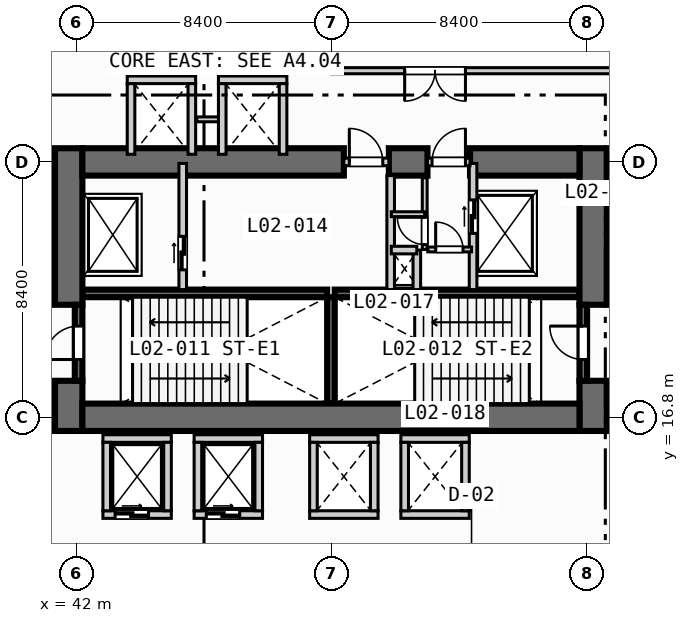
"""IFC4 building model, lengths in metres.
Left out: names, types, materials, properties, quantities, classifications, styles, units other than length and angle.
Written with IfcOpenShell. Run it as: python <this file> out.ifc"""

import sys

from ifc_helpers import new_model, si_unit, direction, frame, frame_2d, origin, place, context, subcontext, project, spatial, rectangle, extrude, element, fill, save


model = new_model("IFC4")
c1 = context("Model", 3, precision=1e-05, world=origin(), true_north=direction((0.0, 1.0)))
c2 = subcontext(c1, "Body", "Model", "MODEL_VIEW")
j1 = project(units=[si_unit("LENGTHUNIT", "METRE"), si_unit("PLANEANGLEUNIT", "RADIAN")], contexts=[c1])
p1 = place(None, origin())
s1 = spatial("IfcSite", under=j1, at=p1, CompositionType="ELEMENT")
p2 = place(p1, origin())
s2 = spatial("IfcBuilding", under=s1, at=p2, CompositionType="ELEMENT")
p3 = place(p2, frame((0.0, 0.0, 10.8)))
s3 = spatial("IfcBuildingStorey", under=s2, at=p3, CompositionType="ELEMENT", Elevation=10.8)
for number, where, z_axis, x_axis in (
    (1, (42.2, 20.875, 0.0), (0.0, 0.0, 1.0), (1.0, 0.0, 0.0)),
    (2, (50.5, 20.875, 0.0), (0.0, 0.0, 1.0), (1.0, 0.0, 0.0)),
):
    element("IfcWall", number, at=place(p3, frame(where, z_axis=z_axis, x_axis=x_axis)), inside=s3, PredefinedType="SOLIDWALL", context=c2, shape_type="SweptSolid", body=[
        extrude(rectangle(XDim=8.05, YDim=0.25, at=frame_2d((4.025, 0.0))), origin(), (0.0, 0.0, 1.0), 4.45),
    ])
p4 = place(p3, frame((50.375, 17.25, 0.0), z_axis=(0.0, 0.0, 1.0), x_axis=(0.0, 1.0, 0.0)))
e3 = element("IfcWall", 3, at=p4, inside=s3, PredefinedType="SOLIDWALL", context=c2, shape_type="SweptSolid", body=[
    extrude(rectangle(XDim=3.5, YDim=0.25, at=frame_2d((1.75, 0.0))), origin(), (0.0, 0.0, 1.0), 4.45),
])
p5 = place(p3, frame((41.75, 16.35, 0.0), z_axis=(0.0, 0.0, 1.0), x_axis=(0.0, 1.0, 0.0)))
e4 = element("IfcWall", 4, at=p5, inside=s3, PredefinedType="SHEAR", context=c2, shape_type="SweptSolid", body=[
    extrude(rectangle(XDim=1.65, YDim=0.9, at=frame_2d((0.825, 0.0))), origin(), (0.0, 0.0, 1.0), 4.45),
])
p6 = place(p3, frame((41.75, 20.5, 0.0), z_axis=(0.0, 0.0, 1.0), x_axis=(0.0, 1.0, 0.0)))
e5 = element("IfcWall", 5, at=p6, inside=s3, PredefinedType="SHEAR", context=c2, shape_type="SweptSolid", body=[
    extrude(rectangle(XDim=5.15, YDim=0.9, at=frame_2d((2.575, 0.0))), origin(), (0.0, 0.0, 1.0), 4.45),
])
p7 = place(p3, frame((59.0, 16.35, 0.0), z_axis=(0.0, 0.0, 1.0), x_axis=(0.0, 1.0, 0.0)))
e6 = element("IfcWall", 6, at=p7, inside=s3, PredefinedType="SHEAR", context=c2, shape_type="SweptSolid", body=[
    extrude(rectangle(XDim=1.65, YDim=0.9, at=frame_2d((0.825, 0.0))), origin(), (0.0, 0.0, 1.0), 4.45),
])
p8 = place(p3, frame((59.0, 20.5, 0.0), z_axis=(0.0, 0.0, 1.0), x_axis=(0.0, 1.0, 0.0)))
e7 = element("IfcWall", 7, at=p8, inside=s3, PredefinedType="SHEAR", context=c2, shape_type="SweptSolid", body=[
    extrude(rectangle(XDim=5.15, YDim=0.9, at=frame_2d((2.575, 0.0))), origin(), (0.0, 0.0, 1.0), 4.45),
])
p9 = place(p3, frame((42.2, 16.8, 0.0), z_axis=(0.0, 0.0, 1.0), x_axis=(1.0, 0.0, 0.0)))
e8 = element("IfcWall", 8, at=p9, inside=s3, PredefinedType="SHEAR", context=c2, shape_type="SweptSolid", body=[
    extrude(rectangle(XDim=16.35, YDim=0.9, at=frame_2d((8.175, 0.0))), origin(), (0.0, 0.0, 1.0), 4.45),
])
p10 = place(p3, frame((42.2, 25.2, 0.0), z_axis=(0.0, 0.0, 1.0), x_axis=(1.0, 0.0, 0.0)))
e9 = element("IfcWall", 9, at=p10, inside=s3, PredefinedType="SHEAR", context=c2, shape_type="SweptSolid", body=[
    extrude(rectangle(XDim=8.6, YDim=0.9, at=frame_2d((4.3, 0.0))), origin(), (0.0, 0.0, 1.0), 4.45),
])
p11 = place(p3, frame((52.28, 25.2, 0.0), z_axis=(0.0, 0.0, 1.0), x_axis=(1.0, 0.0, 0.0)))
e10 = element("IfcWall", 10, at=p11, inside=s3, PredefinedType="SHEAR", context=c2, shape_type="SweptSolid", body=[
    extrude(rectangle(XDim=1.27, YDim=0.9, at=frame_2d((0.635, 0.0))), origin(), (0.0, 0.0, 1.0), 4.45),
])
p12 = place(p3, frame((54.95, 25.2, 0.0), z_axis=(0.0, 0.0, 1.0), x_axis=(1.0, 0.0, 0.0)))
e11 = element("IfcWall", 11, at=p12, inside=s3, PredefinedType="SHEAR", context=c2, shape_type="SweptSolid", body=[
    extrude(rectangle(XDim=3.6, YDim=0.9, at=frame_2d((1.8, 0.0))), origin(), (0.0, 0.0, 1.0), 4.45),
])
p13 = place(p3, frame((42.075, 18.0, 0.0), z_axis=(0.0, 0.0, 1.0), x_axis=(0.0, 1.0, 0.0)))
e12 = element("IfcWall", 12, at=p13, inside=s3, PredefinedType="SOLIDWALL", context=c2, shape_type="SweptSolid", body=[
    extrude(rectangle(XDim=2.5, YDim=0.25, at=frame_2d((1.25, 0.0))), origin(), (0.0, 0.0, 1.0), 4.45),
])
p14 = place(p13, frame((0.7, 0.0, 0.0)))
e13 = element("IfcOpeningElement", 13, at=p14, cuts=e12, PredefinedType="OPENING", context=c2, shape_type="SweptSolid", body=[
    extrude(rectangle(XDim=1.1, YDim=2.15, at=frame_2d((0.55, 1.075))), frame((0.0, 0.135, 0.0), z_axis=(0.0, -1.0, 0.0), x_axis=(1.0, 0.0, 0.0)), (0.0, 0.0, 1.0), 0.27),
])
p15 = place(p3, frame((58.675, 18.0, 0.0), z_axis=(0.0, 0.0, 1.0), x_axis=(0.0, 1.0, 0.0)))
e14 = element("IfcWall", 14, at=p15, inside=s3, PredefinedType="SOLIDWALL", context=c2, shape_type="SweptSolid", body=[
    extrude(rectangle(XDim=2.5, YDim=0.25, at=frame_2d((1.25, 0.0))), origin(), (0.0, 0.0, 1.0), 4.45),
])
p16 = place(p15, frame((0.7, 0.0, 0.0)))
e15 = element("IfcOpeningElement", 15, at=p16, cuts=e14, PredefinedType="OPENING", context=c2, shape_type="SweptSolid", body=[
    extrude(rectangle(XDim=1.1, YDim=2.15, at=frame_2d((0.55, 1.075))), frame((0.0, 0.135, 0.0), z_axis=(0.0, -1.0, 0.0), x_axis=(1.0, 0.0, 0.0)), (0.0, 0.0, 1.0), 0.27),
])
p17 = place(p3, frame((45.5, 21.0, 0.0), z_axis=(0.0, 0.0, 1.0), x_axis=(0.0, 1.0, 0.0)))
e16 = element("IfcWall", 16, at=p17, inside=s3, PredefinedType="SOLIDWALL", context=c2, shape_type="SweptSolid", body=[
    extrude(rectangle(XDim=4.15, YDim=0.25, at=frame_2d((2.075, 0.0))), origin(), (0.0, 0.0, 1.0), 4.45),
])
p18 = place(p17, frame((0.65, 0.0, 0.0)))
e17 = element("IfcOpeningElement", 17, at=p18, cuts=e16, PredefinedType="OPENING", context=c2, shape_type="SweptSolid", body=[
    extrude(rectangle(XDim=1.1, YDim=2.15, at=frame_2d((0.55, 1.075))), frame((0.0, 0.135, 0.0), z_axis=(0.0, -1.0, 0.0), x_axis=(1.0, 0.0, 0.0)), (0.0, 0.0, 1.0), 0.27),
])
p19 = place(p3, frame((50.8, 25.2, 0.0), z_axis=(0.0, 0.0, 1.0), x_axis=(1.0, 0.0, 0.0)))
e18 = element("IfcWall", 18, at=p19, inside=s3, PredefinedType="SOLIDWALL", context=c2, shape_type="SweptSolid", body=[
    extrude(rectangle(XDim=1.48, YDim=0.25, at=frame_2d((0.74, 0.0))), origin(), (0.0, 0.0, 1.0), 4.45),
])
p20 = place(p19, frame((0.18, 0.0, 0.0)))
e19 = element("IfcOpeningElement", 19, at=p20, cuts=e18, PredefinedType="OPENING", context=c2, shape_type="SweptSolid", body=[
    extrude(rectangle(XDim=1.1, YDim=2.15, at=frame_2d((0.55, 1.075))), frame((0.0, 0.135, 0.0), z_axis=(0.0, -1.0, 0.0), x_axis=(1.0, 0.0, 0.0)), (0.0, 0.0, 1.0), 0.27),
])
p21 = place(p3, frame((52.34, 21.0, 0.0), z_axis=(0.0, 0.0, 1.0), x_axis=(0.0, 1.0, 0.0)))
e20 = element("IfcWall", 20, at=p21, inside=s3, PredefinedType="SOLIDWALL", context=c2, shape_type="SweptSolid", body=[
    extrude(rectangle(XDim=3.75, YDim=0.25, at=frame_2d((1.875, 0.0))), origin(), (0.0, 0.0, 1.0), 4.45),
])
p22 = place(p3, frame((55.05, 21.0, 0.0), z_axis=(0.0, 0.0, 1.0), x_axis=(0.0, 1.0, 0.0)))
e21 = element("IfcWall", 21, at=p22, inside=s3, PredefinedType="SOLIDWALL", context=c2, shape_type="SweptSolid", body=[
    extrude(rectangle(XDim=4.15, YDim=0.25, at=frame_2d((2.075, 0.0))), origin(), (0.0, 0.0, 1.0), 4.45),
])
p23 = place(p22, frame((1.85, 0.0, 0.0)))
e22 = element("IfcOpeningElement", 22, at=p23, cuts=e21, PredefinedType="OPENING", context=c2, shape_type="SweptSolid", body=[
    extrude(rectangle(XDim=1.1, YDim=2.15, at=frame_2d((0.55, 1.075))), frame((0.0, 0.135, 0.0), z_axis=(0.0, -1.0, 0.0), x_axis=(1.0, 0.0, 0.0)), (0.0, 0.0, 1.0), 0.27),
])
p24 = place(p3, frame((53.55, 25.2, 0.0), z_axis=(0.0, 0.0, 1.0), x_axis=(1.0, 0.0, 0.0)))
e23 = element("IfcWall", 23, at=p24, inside=s3, PredefinedType="SOLIDWALL", context=c2, shape_type="SweptSolid", body=[
    extrude(rectangle(XDim=1.4, YDim=0.25, at=frame_2d((0.7, 0.0))), origin(), (0.0, 0.0, 1.0), 4.45),
])
p25 = place(p24, frame((0.15, 0.0, 0.0)))
e24 = element("IfcOpeningElement", 24, at=p25, cuts=e23, PredefinedType="OPENING", context=c2, shape_type="SweptSolid", body=[
    extrude(rectangle(XDim=1.1, YDim=2.15, at=frame_2d((0.55, 1.075))), frame((0.0, 0.135, 0.0), z_axis=(0.0, -1.0, 0.0), x_axis=(1.0, 0.0, 0.0)), (0.0, 0.0, 1.0), 0.27),
])
p26 = place(p3, frame((53.2, 21.0, 0.0), z_axis=(0.0, 0.0, 1.0), x_axis=(0.0, 1.0, 0.0)))
e25 = element("IfcWall", 25, at=p26, inside=s3, PredefinedType="SOLIDWALL", context=c2, shape_type="SweptSolid", body=[
    extrude(rectangle(XDim=1.3, YDim=0.25, at=frame_2d((0.65, 0.0))), origin(), (0.0, 0.0, 1.0), 4.45),
])
p27 = place(p3, frame((52.36, 22.3, 0.0), z_axis=(0.0, 0.0, 1.0), x_axis=(1.0, 0.0, 0.0)))
e26 = element("IfcWall", 26, at=p27, inside=s3, PredefinedType="SOLIDWALL", context=c2, shape_type="SweptSolid", body=[
    extrude(rectangle(XDim=0.84, YDim=0.25, at=frame_2d((0.42, 0.0))), origin(), (0.0, 0.0, 1.0), 4.45),
])
p28 = place(p3, frame((53.56, 22.32, 0.0), z_axis=(0.0, 0.0, 1.0), x_axis=(1.0, 0.0, 0.0)))
e27 = element("IfcWall", 27, at=p28, inside=s3, PredefinedType="PARTITIONING", context=c2, shape_type="SweptSolid", body=[
    extrude(rectangle(XDim=1.44, YDim=0.16, at=frame_2d((0.72, 0.0))), origin(), (0.0, 0.0, 1.0), 4.45),
])
p29 = place(p28, frame((0.26, 0.0, 0.0)))
e28 = element("IfcOpeningElement", 28, at=p29, cuts=e27, PredefinedType="OPENING", context=c2, shape_type="SweptSolid", body=[
    extrude(rectangle(XDim=0.9, YDim=2.1, at=frame_2d((0.45, 1.05))), frame((0.0, 0.09, 0.0), z_axis=(0.0, -1.0, 0.0), x_axis=(1.0, 0.0, 0.0)), (0.0, 0.0, 1.0), 0.18),
])
p30 = place(p3, frame((53.46, 22.32, 0.0), z_axis=(0.0, 0.0, 1.0), x_axis=(0.0, 1.0, 0.0)))
e29 = element("IfcWall", 29, at=p30, inside=s3, PredefinedType="PARTITIONING", context=c2, shape_type="SweptSolid", body=[
    extrude(rectangle(XDim=2.36, YDim=0.16, at=frame_2d((1.18, 0.0))), origin(), (0.0, 0.0, 1.0), 4.45),
])
p31 = place(p30, frame((0.16, 0.0, 0.0)))
e30 = element("IfcOpeningElement", 30, at=p31, cuts=e29, PredefinedType="OPENING", context=c2, shape_type="SweptSolid", body=[
    extrude(rectangle(XDim=0.9, YDim=2.1, at=frame_2d((0.45, 1.05))), frame((0.0, 0.09, 0.0), z_axis=(0.0, -1.0, 0.0), x_axis=(1.0, 0.0, 0.0)), (0.0, 0.0, 1.0), 0.18),
])
p32 = place(p3, frame((52.36, 23.48, 0.0), z_axis=(0.0, 0.0, 1.0), x_axis=(1.0, 0.0, 0.0)))
e31 = element("IfcWall", 31, at=p32, inside=s3, PredefinedType="PARTITIONING", context=c2, shape_type="SweptSolid", body=[
    extrude(rectangle(XDim=1.1, YDim=0.16, at=frame_2d((0.55, 0.0))), origin(), (0.0, 0.0, 1.0), 4.45),
])
p33 = place(p3, frame((42.875, 13.6, 0.0), z_axis=(0.0, 0.0, 1.0), x_axis=(1.0, 0.0, 0.0)))
e32 = element("IfcWall", 32, at=p33, inside=s3, PredefinedType="SOLIDWALL", context=c2, shape_type="SweptSolid", body=[
    extrude(rectangle(XDim=2.25, YDim=0.25, at=frame_2d((1.125, 0.0))), origin(), (0.0, 0.0, 1.0), 4.45),
])
p34 = place(p33, frame((0.4, 0.0, 0.0)))
e33 = element("IfcOpeningElement", 33, at=p34, cuts=e32, PredefinedType="OPENING", context=c2, shape_type="SweptSolid", body=[
    extrude(rectangle(XDim=1.1, YDim=2.15, at=frame_2d((0.55, 1.075))), frame((0.0, 0.135, 0.0), z_axis=(0.0, -1.0, 0.0), x_axis=(1.0, 0.0, 0.0)), (0.0, 0.0, 1.0), 0.27),
])
for number, where, z_axis, x_axis in (
    (34, (42.875, 16.1, 0.0), (0.0, 0.0, 1.0), (1.0, 0.0, 0.0)),
    (35, (43.0, 13.725, 0.0), (0.0, 0.0, 1.0), (0.0, 1.0, 0.0)),
    (36, (45.0, 13.725, 0.0), (0.0, 0.0, 1.0), (0.0, 1.0, 0.0)),
):
    element("IfcWall", number, at=place(p3, frame(where, z_axis=z_axis, x_axis=x_axis)), inside=s3, PredefinedType="SOLIDWALL", context=c2, shape_type="SweptSolid", body=[
        extrude(rectangle(XDim=2.25, YDim=0.25, at=frame_2d((1.125, 0.0))), origin(), (0.0, 0.0, 1.0), 4.45),
    ])
p35 = place(p3, frame((45.875, 13.6, 0.0), z_axis=(0.0, 0.0, 1.0), x_axis=(1.0, 0.0, 0.0)))
e37 = element("IfcWall", 37, at=p35, inside=s3, PredefinedType="SOLIDWALL", context=c2, shape_type="SweptSolid", body=[
    extrude(rectangle(XDim=2.25, YDim=0.25, at=frame_2d((1.125, 0.0))), origin(), (0.0, 0.0, 1.0), 4.45),
])
p36 = place(p35, frame((0.4, 0.0, 0.0)))
e38 = element("IfcOpeningElement", 38, at=p36, cuts=e37, PredefinedType="OPENING", context=c2, shape_type="SweptSolid", body=[
    extrude(rectangle(XDim=1.1, YDim=2.15, at=frame_2d((0.55, 1.075))), frame((0.0, 0.135, 0.0), z_axis=(0.0, -1.0, 0.0), x_axis=(1.0, 0.0, 0.0)), (0.0, 0.0, 1.0), 0.27),
])
for number, where, z_axis, x_axis in (
    (39, (45.875, 16.1, 0.0), (0.0, 0.0, 1.0), (1.0, 0.0, 0.0)),
    (40, (46.0, 13.725, 0.0), (0.0, 0.0, 1.0), (0.0, 1.0, 0.0)),
    (41, (48.0, 13.725, 0.0), (0.0, 0.0, 1.0), (0.0, 1.0, 0.0)),
    (42, (49.675, 13.6, 0.0), (0.0, 0.0, 1.0), (1.0, 0.0, 0.0)),
    (43, (49.675, 16.1, 0.0), (0.0, 0.0, 1.0), (1.0, 0.0, 0.0)),
    (44, (49.8, 13.725, 0.0), (0.0, 0.0, 1.0), (0.0, 1.0, 0.0)),
    (45, (51.8, 13.725, 0.0), (0.0, 0.0, 1.0), (0.0, 1.0, 0.0)),
    (46, (52.675, 13.6, 0.0), (0.0, 0.0, 1.0), (1.0, 0.0, 0.0)),
    (47, (52.675, 16.1, 0.0), (0.0, 0.0, 1.0), (1.0, 0.0, 0.0)),
    (48, (52.8, 13.725, 0.0), (0.0, 0.0, 1.0), (0.0, 1.0, 0.0)),
    (49, (54.8, 13.725, 0.0), (0.0, 0.0, 1.0), (0.0, 1.0, 0.0)),
    (50, (43.675, 27.9, 0.0), (0.0, 0.0, 1.0), (1.0, 0.0, 0.0)),
):
    element("IfcWall", number, at=place(p3, frame(where, z_axis=z_axis, x_axis=x_axis)), inside=s3, PredefinedType="SOLIDWALL", context=c2, shape_type="SweptSolid", body=[
        extrude(rectangle(XDim=2.25, YDim=0.25, at=frame_2d((1.125, 0.0))), origin(), (0.0, 0.0, 1.0), 4.45),
    ])
for number, where, z_axis, x_axis in (
    (51, (43.8, 25.45, 0.0), (0.0, 0.0, 1.0), (0.0, 1.0, 0.0)),
    (52, (45.8, 25.45, 0.0), (0.0, 0.0, 1.0), (0.0, 1.0, 0.0)),
):
    element("IfcWall", number, at=place(p3, frame(where, z_axis=z_axis, x_axis=x_axis)), inside=s3, PredefinedType="SOLIDWALL", context=c2, shape_type="SweptSolid", body=[
        extrude(rectangle(XDim=2.325, YDim=0.25, at=frame_2d((1.163, 0.0))), origin(), (0.0, 0.0, 1.0), 4.45),
    ])
p37 = place(p3, frame((45.96, 26.6, 0.0), z_axis=(0.0, 0.0, 1.0), x_axis=(1.0, 0.0, 0.0)))
e53 = element("IfcWall", 53, at=p37, inside=s3, PredefinedType="PARTITIONING", context=c2, shape_type="SweptSolid", body=[
    extrude(rectangle(XDim=0.88, YDim=0.16, at=frame_2d((0.44, 0.0))), origin(), (0.0, 0.0, 1.0), 4.45),
])
p38 = place(p3, frame((46.675, 27.9, 0.0), z_axis=(0.0, 0.0, 1.0), x_axis=(1.0, 0.0, 0.0)))
e54 = element("IfcWall", 54, at=p38, inside=s3, PredefinedType="SOLIDWALL", context=c2, shape_type="SweptSolid", body=[
    extrude(rectangle(XDim=2.25, YDim=0.25, at=frame_2d((1.125, 0.0))), origin(), (0.0, 0.0, 1.0), 4.45),
])
for number, where, z_axis, x_axis in (
    (55, (46.8, 25.45, 0.0), (0.0, 0.0, 1.0), (0.0, 1.0, 0.0)),
    (56, (48.8, 25.45, 0.0), (0.0, 0.0, 1.0), (0.0, 1.0, 0.0)),
):
    element("IfcWall", number, at=place(p3, frame(where, z_axis=z_axis, x_axis=x_axis)), inside=s3, PredefinedType="SOLIDWALL", context=c2, shape_type="SweptSolid", body=[
        extrude(rectangle(XDim=2.325, YDim=0.25, at=frame_2d((1.163, 0.0))), origin(), (0.0, 0.0, 1.0), 4.45),
    ])
p39 = place(p3, frame((50.4, 28.2, 0.0), z_axis=(0.0, 0.0, 1.0), x_axis=(1.0, 0.0, 0.0)))
e57 = element("IfcWall", 57, at=p39, inside=s3, PredefinedType="PARTITIONING", context=c2, shape_type="SweptSolid", body=[
    extrude(rectangle(XDim=38.6, YDim=0.2, at=frame_2d((19.3, 0.0))), origin(), (0.0, 0.0, 1.0), 4.45),
])
p40 = place(p39, frame((2.4, 0.0, 0.0)))
e58 = element("IfcOpeningElement", 58, at=p40, cuts=e57, PredefinedType="OPENING", context=c2, shape_type="SweptSolid", body=[
    extrude(rectangle(XDim=2.0, YDim=2.15, at=frame_2d((1.0, 1.075))), frame((0.0, 0.11, 0.0), z_axis=(0.0, -1.0, 0.0), x_axis=(1.0, 0.0, 0.0)), (0.0, 0.0, 1.0), 0.22),
])
p41 = place(p39, frame((22.0, 0.0, 0.0)))
e59 = element("IfcOpeningElement", 59, at=p41, cuts=e57, PredefinedType="OPENING", context=c2, shape_type="SweptSolid", body=[
    extrude(rectangle(XDim=2.0, YDim=2.15, at=frame_2d((1.0, 1.075))), frame((0.0, 0.11, 0.0), z_axis=(0.0, -1.0, 0.0), x_axis=(1.0, 0.0, 0.0)), (0.0, 0.0, 1.0), 0.22),
])
p42 = place(p3, frame((50.4, 28.2, 0.0), z_axis=(0.0, 0.0, 1.0), x_axis=(0.0, 1.0, 0.0)))
e60 = element("IfcWall", 60, at=p42, inside=s3, PredefinedType="PARTITIONING", context=c2, shape_type="SweptSolid", body=[
    extrude(rectangle(XDim=13.4, YDim=0.22, at=frame_2d((6.7, 0.0))), origin(), (0.0, 0.0, 1.0), 3.6),
])
p43 = place(p14, origin())
e61 = element("IfcDoor", 61, at=p43, inside=s3, OperationType="SINGLE_SWING_LEFT", PredefinedType="DOOR", context=c2, shape_type="SweptSolid", body=[
    extrude(rectangle(XDim=1.1, YDim=2.15, at=frame_2d((0.55, 1.075))), frame((0.0, 0.025, 0.0), z_axis=(0.0, -1.0, 0.0), x_axis=(1.0, 0.0, 0.0)), (0.0, 0.0, 1.0), 0.05),
])
fill(e13, e61)
p44 = place(p16, origin())
e62 = element("IfcDoor", 62, at=p44, inside=s3, OperationType="SINGLE_SWING_RIGHT", PredefinedType="DOOR", context=c2, shape_type="SweptSolid", body=[
    extrude(rectangle(XDim=1.1, YDim=2.15, at=frame_2d((0.55, 1.075))), frame((0.0, 0.025, 0.0), z_axis=(0.0, -1.0, 0.0), x_axis=(1.0, 0.0, 0.0)), (0.0, 0.0, 1.0), 0.05),
])
fill(e15, e62)
p45 = place(p18, origin())
e63 = element("IfcDoor", 63, at=p45, inside=s3, OperationType="SLIDING_TO_LEFT", PredefinedType="DOOR", context=c2, shape_type="SweptSolid", body=[
    extrude(rectangle(XDim=1.1, YDim=2.15, at=frame_2d((0.55, 1.075))), frame((0.0, 0.025, 0.0), z_axis=(0.0, -1.0, 0.0), x_axis=(1.0, 0.0, 0.0)), (0.0, 0.0, 1.0), 0.05),
])
fill(e17, e63)
p46 = place(p20, origin())
e64 = element("IfcDoor", 64, at=p46, inside=s3, OperationType="SINGLE_SWING_LEFT", PredefinedType="DOOR", context=c2, shape_type="SweptSolid", body=[
    extrude(rectangle(XDim=1.1, YDim=2.15, at=frame_2d((0.55, 1.075))), frame((0.0, 0.025, 0.0), z_axis=(0.0, -1.0, 0.0), x_axis=(1.0, 0.0, 0.0)), (0.0, 0.0, 1.0), 0.05),
])
fill(e19, e64)
p47 = place(p23, origin())
e65 = element("IfcDoor", 65, at=p47, inside=s3, OperationType="SLIDING_TO_LEFT", PredefinedType="DOOR", context=c2, shape_type="SweptSolid", body=[
    extrude(rectangle(XDim=1.1, YDim=2.15, at=frame_2d((0.55, 1.075))), frame((0.0, 0.025, 0.0), z_axis=(0.0, -1.0, 0.0), x_axis=(1.0, 0.0, 0.0)), (0.0, 0.0, 1.0), 0.05),
])
fill(e22, e65)
p48 = place(p25, origin())
e66 = element("IfcDoor", 66, at=p48, inside=s3, OperationType="SINGLE_SWING_RIGHT", PredefinedType="DOOR", context=c2, shape_type="SweptSolid", body=[
    extrude(rectangle(XDim=1.1, YDim=2.15, at=frame_2d((0.55, 1.075))), frame((0.0, 0.025, 0.0), z_axis=(0.0, -1.0, 0.0), x_axis=(1.0, 0.0, 0.0)), (0.0, 0.0, 1.0), 0.05),
])
fill(e24, e66)
p49 = place(p29, origin())
e67 = element("IfcDoor", 67, at=p49, inside=s3, OperationType="SINGLE_SWING_LEFT", PredefinedType="DOOR", context=c2, shape_type="SweptSolid", body=[
    extrude(rectangle(XDim=0.9, YDim=2.1, at=frame_2d((0.45, 1.05))), frame((0.0, 0.025, 0.0), z_axis=(0.0, -1.0, 0.0), x_axis=(1.0, 0.0, 0.0)), (0.0, 0.0, 1.0), 0.05),
])
fill(e28, e67)
p50 = place(p31, origin())
e68 = element("IfcDoor", 68, at=p50, inside=s3, OperationType="SINGLE_SWING_RIGHT", PredefinedType="DOOR", context=c2, shape_type="SweptSolid", body=[
    extrude(rectangle(XDim=0.9, YDim=2.1, at=frame_2d((0.45, 1.05))), frame((0.0, 0.025, 0.0), z_axis=(0.0, -1.0, 0.0), x_axis=(1.0, 0.0, 0.0)), (0.0, 0.0, 1.0), 0.05),
])
fill(e30, e68)
p51 = place(p34, origin())
e69 = element("IfcDoor", 69, at=p51, inside=s3, OperationType="SLIDING_TO_LEFT", PredefinedType="DOOR", context=c2, shape_type="SweptSolid", body=[
    extrude(rectangle(XDim=1.1, YDim=2.15, at=frame_2d((0.55, 1.075))), frame((0.0, 0.025, 0.0), z_axis=(0.0, -1.0, 0.0), x_axis=(1.0, 0.0, 0.0)), (0.0, 0.0, 1.0), 0.05),
])
fill(e33, e69)
p52 = place(p36, origin())
e70 = element("IfcDoor", 70, at=p52, inside=s3, OperationType="SLIDING_TO_LEFT", PredefinedType="DOOR", context=c2, shape_type="SweptSolid", body=[
    extrude(rectangle(XDim=1.1, YDim=2.15, at=frame_2d((0.55, 1.075))), frame((0.0, 0.025, 0.0), z_axis=(0.0, -1.0, 0.0), x_axis=(1.0, 0.0, 0.0)), (0.0, 0.0, 1.0), 0.05),
])
fill(e38, e70)
p53 = place(p40, origin())
e71 = element("IfcDoor", 71, at=p53, inside=s3, OperationType="SINGLE_SWING_RIGHT", PredefinedType="DOOR", context=c2, shape_type="SweptSolid", body=[
    extrude(rectangle(XDim=2.0, YDim=2.15, at=frame_2d((1.0, 1.075))), frame((0.0, 0.025, 0.0), z_axis=(0.0, -1.0, 0.0), x_axis=(1.0, 0.0, 0.0)), (0.0, 0.0, 1.0), 0.05),
])
fill(e58, e71)
save(model, sys.argv[1])
